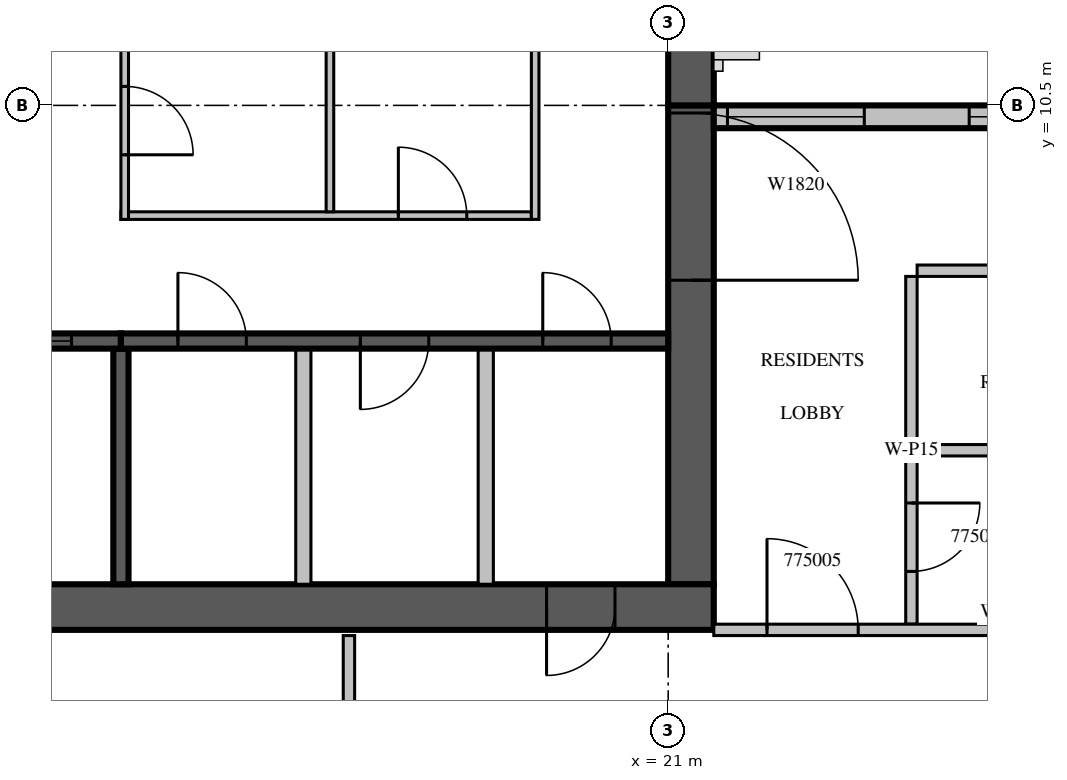
"""IFC4 building model, lengths in metres.
Left out: names, types, materials, properties, quantities, classifications, styles, units other than length and angle.
Written with IfcOpenShell. Run it as: python <this file> out.ifc"""

import sys

from ifc_helpers import new_model, si_unit, direction, frame, frame_2d, origin, place, context, subcontext, project, spatial, rectangle, extrude, source, transform, mapped, element, fill, save


model = new_model("IFC4")
c1 = context("Model", 3, precision=1e-05, world=origin(), true_north=direction((0.0, 1.0)))
c2 = subcontext(c1, "Body", "Model", "MODEL_VIEW")
j1 = project(units=[si_unit("LENGTHUNIT", "METRE"), si_unit("PLANEANGLEUNIT", "RADIAN")], contexts=[c1])
p1 = place(None, origin())
s1 = spatial("IfcSite", under=j1, at=p1, CompositionType="ELEMENT")
p2 = place(p1, origin())
s2 = spatial("IfcBuilding", under=s1, at=p2, CompositionType="ELEMENT")
p3 = place(p2, frame((0.0, 0.0, 323.0)))
s3 = spatial("IfcBuildingStorey", under=s2, at=p3, CompositionType="ELEMENT", Elevation=323.0)
m1 = source(origin(), c2, "Body", "SweptSolid", [
    extrude(rectangle(XDim=6.3, YDim=0.6, at=frame_2d((3.15, 0.0))), origin(), (0.0, 0.0, 1.0), 3.5),
])
p4 = place(p3, frame((21.3, 4.2, 0.0), z_axis=(0.0, 0.0, 1.0), x_axis=(0.0, 1.0, 0.0)))
e1 = element("IfcWall", 1, at=p4, inside=s3, PredefinedType="SHEAR", context=c2, shape_type="MappedRepresentation", body=[
    mapped(m1, transform((0.0, 0.0, 0.0), scale=1.0)),
])
m2 = source(origin(), c2, "Body", "SweptSolid", [
    extrude(rectangle(XDim=2.2, YDim=2.1, at=frame_2d((1.1, 1.05))), frame((0.0, 0.31, 0.0), z_axis=(0.0, -1.0, 0.0), x_axis=(1.0, 0.0, 0.0)), (0.0, 0.0, 1.0), 0.62),
])
p5 = place(p4, frame((4.0, 0.0, 0.0)))
e2 = element("IfcOpeningElement", 2, at=p5, cuts=e1, PredefinedType="OPENING", context=c2, shape_type="MappedRepresentation", body=[
    mapped(m2, transform((0.0, 0.0, 0.0), scale=1.0)),
])
m3 = source(origin(), c2, "Body", "SweptSolid", [
    extrude(rectangle(XDim=17.4, YDim=0.6, at=frame_2d((8.7, 0.0))), origin(), (0.0, 0.0, 1.0), 3.5),
])
p6 = place(p3, frame((4.2, 3.9, 0.0), z_axis=(0.0, 0.0, 1.0), x_axis=(1.0, 0.0, 0.0)))
e3 = element("IfcWall", 3, at=p6, inside=s3, PredefinedType="SHEAR", context=c2, shape_type="MappedRepresentation", body=[
    mapped(m3, transform((0.0, 0.0, 0.0), scale=1.0)),
])
m4 = source(origin(), c2, "Body", "SweptSolid", [
    extrude(rectangle(XDim=0.9, YDim=2.1, at=frame_2d((0.45, 1.05))), frame((0.0, 0.31, 0.0), z_axis=(0.0, -1.0, 0.0), x_axis=(1.0, 0.0, 0.0)), (0.0, 0.0, 1.0), 0.62),
])
p7 = place(p6, frame((15.2, 0.0, 0.0)))
e4 = element("IfcOpeningElement", 4, at=p7, cuts=e3, PredefinedType="OPENING", context=c2, shape_type="MappedRepresentation", body=[
    mapped(m4, transform((0.0, 0.0, 0.0), scale=1.0)),
])
m5 = source(origin(), c2, "Body", "SweptSolid", [
    extrude(rectangle(XDim=10.5, YDim=0.6, at=frame_2d((5.25, 0.0))), origin(), (0.0, 0.0, 1.0), 3.5),
])
p8 = place(p3, frame((21.3, 10.5, 0.0), z_axis=(0.0, 0.0, 1.0), x_axis=(0.0, 1.0, 0.0)))
e5 = element("IfcWall", 5, at=p8, inside=s3, PredefinedType="SHEAR", context=c2, shape_type="MappedRepresentation", body=[
    mapped(m5, transform((0.0, 0.0, 0.0), scale=1.0)),
])
m6 = source(origin(), c2, "Body", "SweptSolid", [
    extrude(rectangle(XDim=1.2, YDim=2.4, at=frame_2d((0.6, 1.2))), frame((0.0, 0.31, 0.0), z_axis=(0.0, -1.0, 0.0), x_axis=(1.0, 0.0, 0.0)), (0.0, 0.0, 1.0), 0.62),
])
p9 = place(p8, frame((5.7, 0.0, 0.6)))
e6 = element("IfcOpeningElement", 6, at=p9, cuts=e5, PredefinedType="OPENING", context=c2, shape_type="MappedRepresentation", body=[
    mapped(m6, transform((0.0, 0.0, 0.0), scale=1.0)),
])
m7 = source(origin(), c2, "Body", "SweptSolid", [
    extrude(rectangle(XDim=7.45, YDim=0.3, at=frame_2d((3.725, 0.0))), origin(), (0.0, 0.0, 1.0), 3.1),
])
p10 = place(p3, frame((29.05, 10.35, 0.0), z_axis=(0.0, 0.0, 1.0), x_axis=(-1.0, 0.0, 0.0)))
e7 = element("IfcWall", 7, at=p10, inside=s3, PredefinedType="STANDARD", context=c2, shape_type="MappedRepresentation", body=[
    mapped(m7, transform((0.0, 0.0, 0.0), scale=1.0)),
])
m8 = source(origin(), c2, "Body", "SweptSolid", [
    extrude(rectangle(XDim=3.0, YDim=2.0, at=frame_2d((1.5, 1.0))), frame((0.0, 0.16, 0.0), z_axis=(0.0, -1.0, 0.0), x_axis=(1.0, 0.0, 0.0)), (0.0, 0.0, 1.0), 0.32),
])
p11 = place(p10, frame((1.09, 0.0, 0.6)))
e8 = element("IfcOpeningElement", 8, at=p11, cuts=e7, PredefinedType="OPENING", context=c2, shape_type="MappedRepresentation", body=[
    mapped(m8, transform((0.0, 0.0, 0.0), scale=1.0)),
])
m9 = source(origin(), c2, "Body", "SweptSolid", [
    extrude(rectangle(XDim=1.8, YDim=2.0, at=frame_2d((0.9, 1.0))), frame((0.0, 0.16, 0.0), z_axis=(0.0, -1.0, 0.0), x_axis=(1.0, 0.0, 0.0)), (0.0, 0.0, 1.0), 0.32),
])
p12 = place(p10, frame((5.47, 0.0, 0.6)))
e9 = element("IfcOpeningElement", 9, at=p12, cuts=e7, PredefinedType="OPENING", context=c2, shape_type="MappedRepresentation", body=[
    mapped(m9, transform((0.0, 0.0, 0.0), scale=1.0)),
])
m10 = source(origin(), c2, "Body", "SweptSolid", [
    extrude(rectangle(XDim=3.1, YDim=0.2, at=frame_2d((1.55, 0.0))), origin(), (0.0, 0.0, 1.0), 3.1),
])
p13 = place(p3, frame((13.8, 4.2, 0.0), z_axis=(0.0, 0.0, 1.0), x_axis=(0.0, 1.0, 0.0)))
e10 = element("IfcWall", 10, at=p13, inside=s3, PredefinedType="SOLIDWALL", context=c2, shape_type="MappedRepresentation", body=[
    mapped(m10, transform((0.0, 0.0, 0.0), scale=1.0)),
])
m11 = source(origin(), c2, "Body", "SweptSolid", [
    extrude(rectangle(XDim=3.1, YDim=0.2, at=frame_2d((1.55, 0.0))), origin(), (0.0, 0.0, 1.0), 3.1),
])
for number, where, z_axis, x_axis in (
    (11, (16.2, 4.2, 0.0), (0.0, 0.0, 1.0), (0.0, 1.0, 0.0)),
    (12, (18.6, 4.2, 0.0), (0.0, 0.0, 1.0), (0.0, 1.0, 0.0)),
):
    element("IfcWall", number, at=place(p3, frame(where, z_axis=z_axis, x_axis=x_axis)), inside=s3, PredefinedType="PARTITIONING", context=c2, shape_type="MappedRepresentation", body=[
        mapped(m11, transform((0.0, 0.0, 0.0), scale=1.0)),
    ])
m12 = source(origin(), c2, "Body", "SweptSolid", [
    extrude(rectangle(XDim=9.6, YDim=0.2, at=frame_2d((4.8, 0.0))), origin(), (0.0, 0.0, 1.0), 3.5),
])
p14 = place(p3, frame((4.2, 7.4, 0.0), z_axis=(0.0, 0.0, 1.0), x_axis=(1.0, 0.0, 0.0)))
e13 = element("IfcWall", 13, at=p14, inside=s3, PredefinedType="SOLIDWALL", context=c2, shape_type="MappedRepresentation", body=[
    mapped(m12, transform((0.0, 0.0, 0.0), scale=1.0)),
])
m13 = source(origin(), c2, "Body", "SweptSolid", [
    extrude(rectangle(XDim=1.1, YDim=2.1, at=frame_2d((0.55, 1.05))), frame((0.0, 0.11, 0.0), z_axis=(0.0, -1.0, 0.0), x_axis=(1.0, 0.0, 0.0)), (0.0, 0.0, 1.0), 0.22),
])
p15 = place(p14, frame((0.65, 0.0, 0.0)))
e14 = element("IfcOpeningElement", 14, at=p15, cuts=e13, PredefinedType="OPENING", context=c2, shape_type="MappedRepresentation", body=[
    mapped(m13, transform((0.0, 0.0, 0.0), scale=1.0)),
])
p16 = place(p14, frame((3.05, 0.0, 0.0)))
e15 = element("IfcOpeningElement", 15, at=p16, cuts=e13, PredefinedType="OPENING", context=c2, shape_type="MappedRepresentation", body=[
    mapped(m13, transform((0.0, 0.0, 0.0), scale=1.0)),
])
p17 = place(p14, frame((5.45, 0.0, 0.0)))
e16 = element("IfcOpeningElement", 16, at=p17, cuts=e13, PredefinedType="OPENING", context=c2, shape_type="MappedRepresentation", body=[
    mapped(m13, transform((0.0, 0.0, 0.0), scale=1.0)),
])
p18 = place(p14, frame((7.85, 0.0, 0.0)))
e17 = element("IfcOpeningElement", 17, at=p18, cuts=e13, PredefinedType="OPENING", context=c2, shape_type="MappedRepresentation", body=[
    mapped(m13, transform((0.0, 0.0, 0.0), scale=1.0)),
])
m14 = source(origin(), c2, "Body", "SweptSolid", [
    extrude(rectangle(XDim=7.2, YDim=0.2, at=frame_2d((3.6, 0.0))), origin(), (0.0, 0.0, 1.0), 3.1),
])
p19 = place(p3, frame((13.8, 7.4, 0.0), z_axis=(0.0, 0.0, 1.0), x_axis=(1.0, 0.0, 0.0)))
e18 = element("IfcWall", 18, at=p19, inside=s3, PredefinedType="SOLIDWALL", context=c2, shape_type="MappedRepresentation", body=[
    mapped(m14, transform((0.0, 0.0, 0.0), scale=1.0)),
])
m15 = source(origin(), c2, "Body", "SweptSolid", [
    extrude(rectangle(XDim=0.9, YDim=2.1, at=frame_2d((0.45, 1.05))), frame((0.0, 0.11, 0.0), z_axis=(0.0, -1.0, 0.0), x_axis=(1.0, 0.0, 0.0)), (0.0, 0.0, 1.0), 0.22),
])
p20 = place(p19, frame((0.75, 0.0, 0.0)))
e19 = element("IfcOpeningElement", 19, at=p20, cuts=e18, PredefinedType="OPENING", context=c2, shape_type="MappedRepresentation", body=[
    mapped(m15, transform((0.0, 0.0, 0.0), scale=1.0)),
])
p21 = place(p19, frame((3.15, 0.0, 0.0)))
e20 = element("IfcOpeningElement", 20, at=p21, cuts=e18, PredefinedType="OPENING", context=c2, shape_type="MappedRepresentation", body=[
    mapped(m15, transform((0.0, 0.0, 0.0), scale=1.0)),
])
p22 = place(p19, frame((5.55, 0.0, 0.0)))
e21 = element("IfcOpeningElement", 21, at=p22, cuts=e18, PredefinedType="OPENING", context=c2, shape_type="MappedRepresentation", body=[
    mapped(m15, transform((0.0, 0.0, 0.0), scale=1.0)),
])
m16 = source(origin(), c2, "Body", "SweptSolid", [
    extrude(rectangle(XDim=5.4, YDim=0.1, at=frame_2d((2.7, 0.0))), origin(), (0.0, 0.0, 1.0), 3.1),
])
p23 = place(p3, frame((13.8, 9.05, 0.0), z_axis=(0.0, 0.0, 1.0), x_axis=(1.0, 0.0, 0.0)))
e22 = element("IfcWall", 22, at=p23, inside=s3, PredefinedType="PARTITIONING", context=c2, shape_type="MappedRepresentation", body=[
    mapped(m16, transform((0.0, 0.0, 0.0), scale=1.0)),
])
m17 = source(origin(), c2, "Body", "SweptSolid", [
    extrude(rectangle(XDim=0.9, YDim=2.1, at=frame_2d((0.45, 1.05))), frame((0.0, 0.06, 0.0), z_axis=(0.0, -1.0, 0.0), x_axis=(1.0, 0.0, 0.0)), (0.0, 0.0, 1.0), 0.12),
])
p24 = place(p23, frame((3.65, 0.0, 0.0)))
e23 = element("IfcOpeningElement", 23, at=p24, cuts=e22, PredefinedType="OPENING", context=c2, shape_type="MappedRepresentation", body=[
    mapped(m17, transform((0.0, 0.0, 0.0), scale=1.0)),
])
m18 = source(origin(), c2, "Body", "SweptSolid", [
    extrude(rectangle(XDim=2.5, YDim=0.1, at=frame_2d((1.25, 0.0))), origin(), (0.0, 0.0, 1.0), 3.1),
])
p25 = place(p3, frame((13.85, 9.0, 0.0), z_axis=(0.0, 0.0, 1.0), x_axis=(0.0, 1.0, 0.0)))
e24 = element("IfcWall", 24, at=p25, inside=s3, PredefinedType="PARTITIONING", context=c2, shape_type="MappedRepresentation", body=[
    mapped(m18, transform((0.0, 0.0, 0.0), scale=1.0)),
])
p26 = place(p25, frame((0.85, 0.0, 0.0)))
e25 = element("IfcOpeningElement", 25, at=p26, cuts=e24, PredefinedType="OPENING", context=c2, shape_type="MappedRepresentation", body=[
    mapped(m17, transform((0.0, 0.0, 0.0), scale=1.0)),
])
m19 = source(origin(), c2, "Body", "SweptSolid", [
    extrude(rectangle(XDim=2.4, YDim=0.1, at=frame_2d((1.2, 0.0))), origin(), (0.0, 0.0, 1.0), 3.1),
])
p27 = place(p3, frame((16.55, 9.1, 0.0), z_axis=(0.0, 0.0, 1.0), x_axis=(0.0, 1.0, 0.0)))
e26 = element("IfcWall", 26, at=p27, inside=s3, PredefinedType="PARTITIONING", context=c2, shape_type="MappedRepresentation", body=[
    mapped(m19, transform((0.0, 0.0, 0.0), scale=1.0)),
])
p28 = place(p3, frame((19.25, 9.0, 0.0), z_axis=(0.0, 0.0, 1.0), x_axis=(0.0, 1.0, 0.0)))
e27 = element("IfcWall", 27, at=p28, inside=s3, PredefinedType="PARTITIONING", context=c2, shape_type="MappedRepresentation", body=[
    mapped(m18, transform((0.0, 0.0, 0.0), scale=1.0)),
])
m20 = source(origin(), c2, "Body", "SweptSolid", [
    extrude(rectangle(XDim=4.575, YDim=0.15, at=frame_2d((2.288, 0.0))), origin(), (0.0, 0.0, 1.0), 3.1),
])
p29 = place(p3, frame((24.2, 8.25, 0.0), z_axis=(0.0, 0.0, 1.0), x_axis=(0.0, -1.0, 0.0)))
e28 = element("IfcWall", 28, at=p29, inside=s3, PredefinedType="PARTITIONING", context=c2, shape_type="MappedRepresentation", body=[
    mapped(m20, transform((0.0, 0.0, 0.0), scale=1.0)),
])
m21 = source(origin(), c2, "Body", "SweptSolid", [
    extrude(rectangle(XDim=0.9, YDim=2.1, at=frame_2d((0.45, 1.05))), frame((0.0, 0.085, 0.0), z_axis=(0.0, -1.0, 0.0), x_axis=(1.0, 0.0, 0.0)), (0.0, 0.0, 1.0), 0.17),
])
p30 = place(p29, frame((2.981, 0.0, 0.0)))
e29 = element("IfcOpeningElement", 29, at=p30, cuts=e28, PredefinedType="OPENING", context=c2, shape_type="MappedRepresentation", body=[
    mapped(m21, transform((0.0, 0.0, 0.0), scale=1.0)),
])
m22 = source(origin(), c2, "Body", "SweptSolid", [
    extrude(rectangle(XDim=5.05, YDim=0.15, at=frame_2d((2.525, 0.0))), origin(), (0.0, 0.0, 1.0), 3.1),
])
p31 = place(p3, frame((29.325, 8.325, 0.0), z_axis=(0.0, 0.0, 1.0), x_axis=(-1.0, 0.0, 0.0)))
e30 = element("IfcWall", 30, at=p31, inside=s3, PredefinedType="PARTITIONING", context=c2, shape_type="MappedRepresentation", body=[
    mapped(m22, transform((0.0, 0.0, 0.0), scale=1.0)),
])
m23 = source(origin(), c2, "Body", "SweptSolid", [
    extrude(rectangle(XDim=1.0, YDim=2.1, at=frame_2d((0.5, 1.05))), frame((0.0, 0.085, 0.0), z_axis=(0.0, -1.0, 0.0), x_axis=(1.0, 0.0, 0.0)), (0.0, 0.0, 1.0), 0.17),
])
p32 = place(p31, frame((2.025, 0.0, 0.0)))
e31 = element("IfcOpeningElement", 31, at=p32, cuts=e30, PredefinedType="OPENING", context=c2, shape_type="MappedRepresentation", body=[
    mapped(m23, transform((0.0, 0.0, 0.0), scale=1.0)),
])
p33 = place(p3, frame((29.325, 5.963, 0.0), z_axis=(0.0, 0.0, 1.0), x_axis=(-1.0, 0.0, 0.0)))
e32 = element("IfcWall", 32, at=p33, inside=s3, PredefinedType="PARTITIONING", context=c2, shape_type="MappedRepresentation", body=[
    mapped(m22, transform((0.0, 0.0, 0.0), scale=1.0)),
])
m24 = source(origin(), c2, "Body", "SweptSolid", [
    extrude(rectangle(XDim=3.225, YDim=0.15, at=frame_2d((1.613, 0.0))), origin(), (0.0, 0.0, 1.0), 3.1),
])
p34 = place(p3, frame((16.8, 3.525, 0.0), z_axis=(0.0, 0.0, 1.0), x_axis=(0.0, -1.0, 0.0)))
e33 = element("IfcWall", 33, at=p34, inside=s3, PredefinedType="PARTITIONING", context=c2, shape_type="MappedRepresentation", body=[
    mapped(m24, transform((0.0, 0.0, 0.0), scale=1.0)),
])
p35 = place(p34, frame((1.125, 0.0, 0.0)))
e34 = element("IfcOpeningElement", 34, at=p35, cuts=e33, PredefinedType="OPENING", context=c2, shape_type="MappedRepresentation", body=[
    mapped(m21, transform((0.0, 0.0, 0.0), scale=1.0)),
])
m25 = source(origin(), c2, "Body", "SweptSolid", [
    extrude(rectangle(XDim=7.725, YDim=0.15, at=frame_2d((3.862, 0.0))), origin(), (0.0, 0.0, 1.0), 3.1),
])
p36 = place(p3, frame((21.6, 3.6, 0.0), z_axis=(0.0, 0.0, 1.0), x_axis=(1.0, 0.0, 0.0)))
e35 = element("IfcWall", 35, at=p36, inside=s3, PredefinedType="PARTITIONING", context=c2, shape_type="MappedRepresentation", body=[
    mapped(m25, transform((0.0, 0.0, 0.0), scale=1.0)),
])
m26 = source(origin(), c2, "Body", "SweptSolid", [
    extrude(rectangle(XDim=1.2, YDim=2.1, at=frame_2d((0.6, 1.05))), frame((0.0, 0.085, 0.0), z_axis=(0.0, -1.0, 0.0), x_axis=(1.0, 0.0, 0.0)), (0.0, 0.0, 1.0), 0.17),
])
p37 = place(p36, frame((0.7, 0.0, 0.0)))
e36 = element("IfcOpeningElement", 36, at=p37, cuts=e35, PredefinedType="OPENING", context=c2, shape_type="MappedRepresentation", body=[
    mapped(m26, transform((0.0, 0.0, 0.0), scale=1.0)),
])
m27 = source(origin(), c2, "Body", "SweptSolid", [
    extrude(rectangle(XDim=3.0, YDim=2.0, at=frame_2d((1.5, 1.0))), frame((0.0, 0.03, 0.0), z_axis=(0.0, -1.0, 0.0), x_axis=(1.0, 0.0, 0.0)), (0.0, 0.0, 1.0), 0.06),
])
p38 = place(p11, origin())
e37 = element("IfcWindow", 37, at=p38, inside=s3, PartitioningType="SINGLE_PANEL", PredefinedType="WINDOW", context=c2, shape_type="MappedRepresentation", body=[
    mapped(m27, transform((0.0, 0.0, 0.0), scale=1.0)),
])
fill(e8, e37)
m28 = source(origin(), c2, "Body", "SweptSolid", [
    extrude(rectangle(XDim=1.8, YDim=2.0, at=frame_2d((0.9, 1.0))), frame((0.0, 0.03, 0.0), z_axis=(0.0, -1.0, 0.0), x_axis=(1.0, 0.0, 0.0)), (0.0, 0.0, 1.0), 0.06),
])
p39 = place(p12, origin())
e38 = element("IfcWindow", 38, at=p39, inside=s3, PartitioningType="SINGLE_PANEL", PredefinedType="WINDOW", context=c2, shape_type="MappedRepresentation", body=[
    mapped(m28, transform((0.0, 0.0, 0.0), scale=1.0)),
])
fill(e9, e38)
m29 = source(origin(), c2, "Body", "SweptSolid", [
    extrude(rectangle(XDim=1.1, YDim=2.1, at=frame_2d((0.55, 1.05))), frame((0.0, 0.025, 0.0), z_axis=(0.0, -1.0, 0.0), x_axis=(1.0, 0.0, 0.0)), (0.0, 0.0, 1.0), 0.05),
])
p40 = place(p18, origin())
e39 = element("IfcDoor", 39, at=p40, inside=s3, OperationType="SLIDING_TO_LEFT", PredefinedType="DOOR", context=c2, shape_type="MappedRepresentation", body=[
    mapped(m29, transform((0.0, 0.0, 0.0), scale=1.0)),
])
fill(e17, e39)
m30 = source(origin(), c2, "Body", "SweptSolid", [
    extrude(rectangle(XDim=0.9, YDim=2.1, at=frame_2d((0.45, 1.05))), frame((0.0, 0.025, 0.0), z_axis=(0.0, -1.0, 0.0), x_axis=(1.0, 0.0, 0.0)), (0.0, 0.0, 1.0), 0.05),
])
p41 = place(p20, origin())
e40 = element("IfcDoor", 40, at=p41, inside=s3, OperationType="SINGLE_SWING_LEFT", PredefinedType="DOOR", context=c2, shape_type="MappedRepresentation", body=[
    mapped(m30, transform((0.0, 0.0, 0.0), scale=1.0)),
])
fill(e19, e40)
p42 = place(p21, origin())
e41 = element("IfcDoor", 41, at=p42, inside=s3, OperationType="SINGLE_SWING_RIGHT", PredefinedType="DOOR", context=c2, shape_type="MappedRepresentation", body=[
    mapped(m30, transform((0.0, 0.0, 0.0), scale=1.0)),
])
fill(e20, e41)
p43 = place(p22, origin())
e42 = element("IfcDoor", 42, at=p43, inside=s3, OperationType="SINGLE_SWING_LEFT", PredefinedType="DOOR", context=c2, shape_type="MappedRepresentation", body=[
    mapped(m30, transform((0.0, 0.0, 0.0), scale=1.0)),
])
fill(e21, e42)
p44 = place(p24, origin())
e43 = element("IfcDoor", 43, at=p44, inside=s3, OperationType="SINGLE_SWING_LEFT", PredefinedType="DOOR", context=c2, shape_type="MappedRepresentation", body=[
    mapped(m30, transform((0.0, 0.0, 0.0), scale=1.0)),
])
fill(e23, e43)
p45 = place(p26, origin())
e44 = element("IfcDoor", 44, at=p45, inside=s3, OperationType="SINGLE_SWING_RIGHT", PredefinedType="DOOR", context=c2, shape_type="MappedRepresentation", body=[
    mapped(m30, transform((0.0, 0.0, 0.0), scale=1.0)),
])
fill(e25, e44)
m31 = source(origin(), c2, "Body", "SweptSolid", [
    extrude(rectangle(XDim=2.2, YDim=2.1, at=frame_2d((1.1, 1.05))), frame((0.0, 0.025, 0.0), z_axis=(0.0, -1.0, 0.0), x_axis=(1.0, 0.0, 0.0)), (0.0, 0.0, 1.0), 0.05),
])
p46 = place(p5, origin())
e45 = element("IfcDoor", 45, at=p46, inside=s3, OperationType="DOUBLE_DOOR_SINGLE_SWING", PredefinedType="DOOR", context=c2, shape_type="MappedRepresentation", body=[
    mapped(m31, transform((0.0, 0.0, 0.0), scale=1.0)),
])
fill(e2, e45)
p47 = place(p7, origin())
e46 = element("IfcDoor", 46, at=p47, inside=s3, OperationType="SINGLE_SWING_RIGHT", PredefinedType="DOOR", context=c2, shape_type="MappedRepresentation", body=[
    mapped(m30, transform((0.0, 0.0, 0.0), scale=1.0)),
])
fill(e4, e46)
p48 = place(p30, origin())
e47 = element("IfcDoor", 47, at=p48, inside=s3, OperationType="SINGLE_SWING_LEFT", PredefinedType="DOOR", context=c2, shape_type="MappedRepresentation", body=[
    mapped(m30, transform((0.0, 0.0, 0.0), scale=1.0)),
])
fill(e29, e47)
m32 = source(origin(), c2, "Body", "SweptSolid", [
    extrude(rectangle(XDim=1.2, YDim=2.1, at=frame_2d((0.6, 1.05))), frame((0.0, 0.025, 0.0), z_axis=(0.0, -1.0, 0.0), x_axis=(1.0, 0.0, 0.0)), (0.0, 0.0, 1.0), 0.05),
])
p49 = place(p37, origin())
e48 = element("IfcDoor", 48, at=p49, inside=s3, OperationType="SINGLE_SWING_LEFT", PredefinedType="DOOR", context=c2, shape_type="MappedRepresentation", body=[
    mapped(m32, transform((0.0, 0.0, 0.0), scale=1.0)),
])
fill(e36, e48)
save(model, sys.argv[1])
